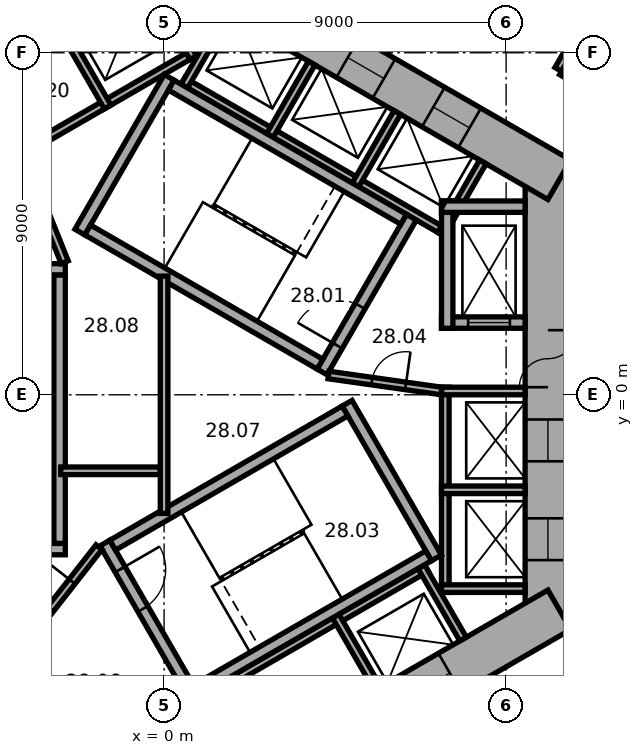
"""IFC4 building model, lengths in metres.
Left out: names, types, materials, properties, quantities, classifications, styles, units other than length and angle.
Written with IfcOpenShell. Run it as: python <this file> out.ifc"""

import sys

from ifc_helpers import new_model, si_unit, direction, frame, frame_2d, origin, place, context, subcontext, project, spatial, rectangle, extrude, element, fill, save


model = new_model("IFC4")
c1 = context("Model", 3, precision=1e-05, world=origin(), true_north=direction((0.0, 1.0)))
c2 = subcontext(c1, "Body", "Model", "MODEL_VIEW")
j1 = project(units=[si_unit("LENGTHUNIT", "METRE"), si_unit("PLANEANGLEUNIT", "RADIAN")], contexts=[c1])
p1 = place(None, origin())
s1 = spatial("IfcSite", under=j1, at=p1, CompositionType="ELEMENT")
p2 = place(p1, origin())
s2 = spatial("IfcBuilding", under=s1, at=p2, CompositionType="ELEMENT")
p3 = place(p2, frame((0.0, 0.0, 116.6)))
s3 = spatial("IfcBuildingStorey", under=s2, at=p3, CompositionType="ELEMENT", Elevation=116.6)
p4 = place(p3, frame((10.1, -6.177, 0.0), z_axis=(0.0, 0.0, 1.0), x_axis=(0.0, 1.0, 0.0)))
e1 = element("IfcWall", 1, at=p4, inside=s3, PredefinedType="SHEAR", context=c2, shape_type="SweptSolid", body=[
    extrude(rectangle(XDim=12.355, YDim=1.2, at=frame_2d((6.177, 0.0))), origin(), (0.0, 0.0, 1.0), 3.3),
])
p5 = place(p4, frame((6.378, 0.0, 0.0)))
e2 = element("IfcOpeningElement", 2, at=p5, cuts=e1, PredefinedType="OPENING", context=c2, shape_type="SweptSolid", body=[
    extrude(rectangle(XDim=1.5, YDim=2.1, at=frame_2d((0.75, 1.05))), frame((0.0, 0.61, 0.0), z_axis=(0.0, -1.0, 0.0), x_axis=(1.0, 0.0, 0.0)), (0.0, 0.0, 1.0), 1.22),
])
p6 = place(p4, frame((1.828, 0.0, 0.0)))
e3 = element("IfcOpeningElement", 3, at=p6, cuts=e1, PredefinedType="OPENING", context=c2, shape_type="SweptSolid", body=[
    extrude(rectangle(XDim=1.1, YDim=2.1, at=frame_2d((0.55, 1.05))), frame((0.0, 0.61, 0.0), z_axis=(0.0, -1.0, 0.0), x_axis=(1.0, 0.0, 0.0)), (0.0, 0.0, 1.0), 1.22),
])
p7 = place(p4, frame((4.427, 0.0, 0.0)))
e4 = element("IfcOpeningElement", 4, at=p7, cuts=e1, PredefinedType="OPENING", context=c2, shape_type="SweptSolid", body=[
    extrude(rectangle(XDim=1.1, YDim=2.1, at=frame_2d((0.55, 1.05))), frame((0.0, 0.61, 0.0), z_axis=(0.0, -1.0, 0.0), x_axis=(1.0, 0.0, 0.0)), (0.0, 0.0, 1.0), 1.22),
])
p8 = place(p3, frame((10.4, 5.658, 0.0), z_axis=(0.0, 0.0, 1.0), x_axis=(-0.866021384402, 0.500006961711, 0.0)))
e5 = element("IfcWall", 5, at=p8, inside=s3, PredefinedType="SHEAR", context=c2, shape_type="SweptSolid", body=[
    extrude(rectangle(XDim=12.355, YDim=1.2, at=frame_2d((6.178, 0.0))), origin(), (0.0, 0.0, 1.0), 3.3),
])
p9 = place(p8, frame((2.728, 0.0, 0.0)))
e6 = element("IfcOpeningElement", 6, at=p9, cuts=e5, PredefinedType="OPENING", context=c2, shape_type="SweptSolid", body=[
    extrude(rectangle(XDim=1.1, YDim=2.1, at=frame_2d((0.55, 1.05))), frame((0.0, 0.61, 0.0), z_axis=(0.0, -1.0, 0.0), x_axis=(1.0, 0.0, 0.0)), (0.0, 0.0, 1.0), 1.22),
])
p10 = place(p8, frame((5.328, 0.0, 0.0)))
e7 = element("IfcOpeningElement", 7, at=p10, cuts=e5, PredefinedType="OPENING", context=c2, shape_type="SweptSolid", body=[
    extrude(rectangle(XDim=1.1, YDim=2.1, at=frame_2d((0.55, 1.05))), frame((0.0, 0.61, 0.0), z_axis=(0.0, -1.0, 0.0), x_axis=(1.0, 0.0, 0.0)), (0.0, 0.0, 1.0), 1.22),
])
p11 = place(p8, frame((7.928, 0.0, 0.0)))
e8 = element("IfcOpeningElement", 8, at=p11, cuts=e5, PredefinedType="OPENING", context=c2, shape_type="SweptSolid", body=[
    extrude(rectangle(XDim=1.1, YDim=2.1, at=frame_2d((0.55, 1.05))), frame((0.0, 0.61, 0.0), z_axis=(0.0, -1.0, 0.0), x_axis=(1.0, 0.0, 0.0)), (0.0, 0.0, 1.0), 1.22),
])
p12 = place(p3, frame((0.3, 11.836, 0.0), z_axis=(0.0, 0.0, 1.0), x_axis=(-0.866021384402, -0.500006961711, 0.0)))
e9 = element("IfcWall", 9, at=p12, inside=s3, PredefinedType="SHEAR", context=c2, shape_type="SweptSolid", body=[
    extrude(rectangle(XDim=12.355, YDim=1.2, at=frame_2d((6.178, 0.0))), origin(), (0.0, 0.0, 1.0), 3.3),
])
p13 = place(p12, frame((6.378, 0.0, 0.0)))
e10 = element("IfcOpeningElement", 10, at=p13, cuts=e9, PredefinedType="OPENING", context=c2, shape_type="SweptSolid", body=[
    extrude(rectangle(XDim=1.5, YDim=2.1, at=frame_2d((0.75, 1.05))), frame((0.0, 0.61, 0.0), z_axis=(0.0, -1.0, 0.0), x_axis=(1.0, 0.0, 0.0)), (0.0, 0.0, 1.0), 1.22),
])
p14 = place(p12, frame((1.828, 0.0, 0.0)))
e11 = element("IfcOpeningElement", 11, at=p14, cuts=e9, PredefinedType="OPENING", context=c2, shape_type="SweptSolid", body=[
    extrude(rectangle(XDim=1.1, YDim=2.1, at=frame_2d((0.55, 1.05))), frame((0.0, 0.61, 0.0), z_axis=(0.0, -1.0, 0.0), x_axis=(1.0, 0.0, 0.0)), (0.0, 0.0, 1.0), 1.22),
])
p15 = place(p3, frame((-10.4, -5.658, 0.0), z_axis=(0.0, 0.0, 1.0), x_axis=(0.866021384402, -0.500006961711, 0.0)))
e12 = element("IfcWall", 12, at=p15, inside=s3, PredefinedType="SHEAR", context=c2, shape_type="SweptSolid", body=[
    extrude(rectangle(XDim=12.355, YDim=1.2, at=frame_2d((6.178, 0.0))), origin(), (0.0, 0.0, 1.0), 3.3),
])
p16 = place(p15, frame((6.378, 0.0, 0.0)))
e13 = element("IfcOpeningElement", 13, at=p16, cuts=e12, PredefinedType="OPENING", context=c2, shape_type="SweptSolid", body=[
    extrude(rectangle(XDim=1.5, YDim=2.1, at=frame_2d((0.75, 1.05))), frame((0.0, 0.61, 0.0), z_axis=(0.0, -1.0, 0.0), x_axis=(1.0, 0.0, 0.0)), (0.0, 0.0, 1.0), 1.22),
])
p17 = place(p15, frame((3.228, 0.0, 0.0)))
e14 = element("IfcOpeningElement", 14, at=p17, cuts=e12, PredefinedType="OPENING", context=c2, shape_type="SweptSolid", body=[
    extrude(rectangle(XDim=0.9, YDim=2.1, at=frame_2d((0.45, 1.05))), frame((0.0, 0.61, 0.0), z_axis=(0.0, -1.0, 0.0), x_axis=(1.0, 0.0, 0.0)), (0.0, 0.0, 1.0), 1.22),
])
p18 = place(p3, frame((-0.3, -11.836, 0.0), z_axis=(0.0, 0.0, 1.0), x_axis=(0.866021384402, 0.500006961711, 0.0)))
e15 = element("IfcWall", 15, at=p18, inside=s3, PredefinedType="SHEAR", context=c2, shape_type="SweptSolid", body=[
    extrude(rectangle(XDim=12.355, YDim=1.2, at=frame_2d((6.178, 0.0))), origin(), (0.0, 0.0, 1.0), 3.3),
])
p19 = place(p18, frame((4.128, 0.0, 0.0)))
e16 = element("IfcOpeningElement", 16, at=p19, cuts=e15, PredefinedType="OPENING", context=c2, shape_type="SweptSolid", body=[
    extrude(rectangle(XDim=0.9, YDim=2.1, at=frame_2d((0.45, 1.05))), frame((0.0, 0.61, 0.0), z_axis=(0.0, -1.0, 0.0), x_axis=(1.0, 0.0, 0.0)), (0.0, 0.0, 1.0), 1.22),
])
p20 = place(p18, frame((7.928, 0.0, 0.0)))
e17 = element("IfcOpeningElement", 17, at=p20, cuts=e15, PredefinedType="OPENING", context=c2, shape_type="SweptSolid", body=[
    extrude(rectangle(XDim=1.1, YDim=2.1, at=frame_2d((0.55, 1.05))), frame((0.0, 0.61, 0.0), z_axis=(0.0, -1.0, 0.0), x_axis=(1.0, 0.0, 0.0)), (0.0, 0.0, 1.0), 1.22),
])
p21 = place(p3, frame((7.4, -5.2, 0.0), z_axis=(0.0, 0.0, 1.0), x_axis=(0.0, 1.0, 0.0)))
e18 = element("IfcWall", 18, at=p21, inside=s3, PredefinedType="PARTITIONING", context=c2, shape_type="SweptSolid", body=[
    extrude(rectangle(XDim=5.4, YDim=0.2, at=frame_2d((2.7, 0.0))), origin(), (0.0, 0.0, 1.0), 2.95),
])
for number, where, z_axis, x_axis in (
    (19, (7.3, -5.1, 0.0), (0.0, 0.0, 1.0), (1.0, 0.0, 0.0)),
    (20, (7.3, -2.5, 0.0), (0.0, 0.0, 1.0), (1.0, 0.0, 0.0)),
    (21, (7.3, 0.1, 0.0), (0.0, 0.0, 1.0), (1.0, 0.0, 0.0)),
):
    element("IfcWall", number, at=place(p3, frame(where, z_axis=z_axis, x_axis=x_axis)), inside=s3, PredefinedType="PARTITIONING", context=c2, shape_type="SweptSolid", body=[
        extrude(rectangle(XDim=2.2, YDim=0.2, at=frame_2d((1.1, 0.0))), origin(), (0.0, 0.0, 1.0), 2.95),
    ])
p22 = place(p3, frame((7.424, 4.259, 0.0), z_axis=(0.0, 0.0, 1.0), x_axis=(-0.866026010844, 0.49999894854, 0.0)))
e22 = element("IfcWall", 22, at=p22, inside=s3, PredefinedType="PARTITIONING", context=c2, shape_type="SweptSolid", body=[
    extrude(rectangle(XDim=8.0, YDim=0.2, at=frame_2d((4.0, 0.0))), origin(), (0.0, 0.0, 1.0), 2.95),
])
for number, where, z_axis, x_axis in (
    (23, (7.287, 4.222, 0.0), (0.0, 0.0, 1.0), (0.5, 0.866, 0.0)),
    (24, (5.036, 5.522, 0.0), (0.0, 0.0, 1.0), (0.5, 0.866, 0.0)),
    (25, (2.784, 6.822, 0.0), (0.0, 0.0, 1.0), (0.5, 0.866, 0.0)),
    (26, (0.532, 8.122, 0.0), (0.0, 0.0, 1.0), (0.5, 0.866, 0.0)),
):
    element("IfcWall", number, at=place(p3, frame(where, z_axis=z_axis, x_axis=x_axis)), inside=s3, PredefinedType="PARTITIONING", context=c2, shape_type="SweptSolid", body=[
        extrude(rectangle(XDim=2.2, YDim=0.2, at=frame_2d((1.1, 0.0))), origin(), (0.0, 0.0, 1.0), 2.95),
    ])
p23 = place(p3, frame((0.803, 9.009, 0.0), z_axis=(0.0, 0.0, 1.0), x_axis=(-0.866028230842, -0.499995103361, 0.0)))
e27 = element("IfcWall", 27, at=p23, inside=s3, PredefinedType="PARTITIONING", context=c2, shape_type="SweptSolid", body=[
    extrude(rectangle(XDim=5.4, YDim=0.2, at=frame_2d((2.7, 0.0))), origin(), (0.0, 0.0, 1.0), 2.95),
])
p24 = place(p3, frame((0.767, 8.872, 0.0), z_axis=(0.0, 0.0, 1.0), x_axis=(-0.499994660107, 0.866028486751, 0.0)))
e28 = element("IfcWall", 28, at=p24, inside=s3, PredefinedType="PARTITIONING", context=c2, shape_type="SweptSolid", body=[
    extrude(rectangle(XDim=2.2, YDim=0.2, at=frame_2d((1.1, 0.0))), origin(), (0.0, 0.0, 1.0), 2.95),
])
p25 = place(p3, frame((-1.485, 7.572, 0.0), z_axis=(0.0, 0.0, 1.0), x_axis=(-0.50002983664, 0.866008176907, 0.0)))
e29 = element("IfcWall", 29, at=p25, inside=s3, PredefinedType="PARTITIONING", context=c2, shape_type="SweptSolid", body=[
    extrude(rectangle(XDim=2.2, YDim=0.2, at=frame_2d((1.1, 0.0))), origin(), (0.0, 0.0, 1.0), 2.95),
])
p26 = place(p3, frame((-0.024, -8.559, 0.0), z_axis=(0.0, 0.0, 1.0), x_axis=(0.866026010844, 0.49999894854, 0.0)))
e30 = element("IfcWall", 30, at=p26, inside=s3, PredefinedType="PARTITIONING", context=c2, shape_type="SweptSolid", body=[
    extrude(rectangle(XDim=8.0, YDim=0.2, at=frame_2d((4.0, 0.0))), origin(), (0.0, 0.0, 1.0), 2.95),
])
for number, where, z_axis, x_axis in (
    (31, (4.516, -5.822, 0.0), (0.0, 0.0, 1.0), (0.5, -0.866, 0.0)),
    (32, (6.768, -4.522, 0.0), (0.0, 0.0, 1.0), (0.5, -0.866, 0.0)),
):
    element("IfcWall", number, at=place(p3, frame(where, z_axis=z_axis, x_axis=x_axis)), inside=s3, PredefinedType="PARTITIONING", context=c2, shape_type="SweptSolid", body=[
        extrude(rectangle(XDim=2.2, YDim=0.2, at=frame_2d((1.1, 0.0))), origin(), (0.0, 0.0, 1.0), 2.95),
    ])
p27 = place(p3, frame((4.158, 0.602, 0.0), z_axis=(0.0, 0.0, 1.0), x_axis=(0.499977259774, 0.866038532462, 0.0)))
e33 = element("IfcWall", 33, at=p27, inside=s3, PredefinedType="SHEAR", context=c2, shape_type="SweptSolid", body=[
    extrude(rectangle(XDim=4.7, YDim=0.3, at=frame_2d((2.35, 0.0))), origin(), (0.0, 0.0, 1.0), 2.95),
])
p28 = place(p27, frame((0.8, 0.0, 0.0)))
e34 = element("IfcOpeningElement", 34, at=p28, cuts=e33, PredefinedType="OPENING", context=c2, shape_type="SweptSolid", body=[
    extrude(rectangle(XDim=1.2, YDim=2.1, at=frame_2d((0.6, 1.05))), frame((0.0, 0.16, 0.0), z_axis=(0.0, -1.0, 0.0), x_axis=(1.0, 0.0, 0.0)), (0.0, 0.0, 1.0), 0.32),
])
p29 = place(p3, frame((-2.216, 4.282, 0.0), z_axis=(0.0, 0.0, 1.0), x_axis=(0.499977259774, 0.866038532462, 0.0)))
e35 = element("IfcWall", 35, at=p29, inside=s3, PredefinedType="SHEAR", context=c2, shape_type="SweptSolid", body=[
    extrude(rectangle(XDim=4.7, YDim=0.3, at=frame_2d((2.35, 0.0))), origin(), (0.0, 0.0, 1.0), 2.95),
])
for number, where, z_axis, x_axis in (
    (36, (4.103, 0.807, 0.0), (0.0, 0.0, 1.0), (-0.866, 0.5, 0.0)),
    (37, (6.303, 4.617, 0.0), (0.0, 0.0, 1.0), (-0.866, 0.5, 0.0)),
):
    element("IfcWall", number, at=place(p3, frame(where, z_axis=z_axis, x_axis=x_axis)), inside=s3, PredefinedType="SHEAR", context=c2, shape_type="SweptSolid", body=[
        extrude(rectangle(XDim=7.06, YDim=0.3, at=frame_2d((3.53, 0.0))), origin(), (0.0, 0.0, 1.0), 2.95),
    ])
p30 = place(p3, frame((-2.6, 3.3, 0.0), z_axis=(0.0, 0.0, 1.0), x_axis=(-1.0, 0.0, 0.0)))
e38 = element("IfcWall", 38, at=p30, inside=s3, PredefinedType="SHEAR", context=c2, shape_type="SweptSolid", body=[
    extrude(rectangle(XDim=4.7, YDim=0.3, at=frame_2d((2.35, 0.0))), origin(), (0.0, 0.0, 1.0), 2.95),
])
p31 = place(p30, frame((0.8, 0.0, 0.0)))
e39 = element("IfcOpeningElement", 39, at=p31, cuts=e38, PredefinedType="OPENING", context=c2, shape_type="SweptSolid", body=[
    extrude(rectangle(XDim=1.2, YDim=2.1, at=frame_2d((0.6, 1.05))), frame((0.0, 0.16, 0.0), z_axis=(0.0, -1.0, 0.0), x_axis=(1.0, 0.0, 0.0)), (0.0, 0.0, 1.0), 0.32),
])
p32 = place(p3, frame((-2.6, -4.06, 0.0), z_axis=(0.0, 0.0, 1.0), x_axis=(-1.0, 0.0, 0.0)))
e40 = element("IfcWall", 40, at=p32, inside=s3, PredefinedType="SHEAR", context=c2, shape_type="SweptSolid", body=[
    extrude(rectangle(XDim=4.7, YDim=0.3, at=frame_2d((2.35, 0.0))), origin(), (0.0, 0.0, 1.0), 2.95),
])
p33 = place(p3, frame((-2.75, 3.15, 0.0), z_axis=(0.0, 0.0, 1.0), x_axis=(0.0, -1.0, 0.0)))
e41 = element("IfcWall", 41, at=p33, inside=s3, PredefinedType="SHEAR", context=c2, shape_type="SweptSolid", body=[
    extrude(rectangle(XDim=7.06, YDim=0.3, at=frame_2d((3.53, 0.0))), origin(), (0.0, 0.0, 1.0), 2.95),
])
p34 = place(p3, frame((-1.558, -3.902, 0.0), z_axis=(0.0, 0.0, 1.0), x_axis=(0.499977259774, -0.866038532462, 0.0)))
e42 = element("IfcWall", 42, at=p34, inside=s3, PredefinedType="SHEAR", context=c2, shape_type="SweptSolid", body=[
    extrude(rectangle(XDim=4.7, YDim=0.3, at=frame_2d((2.35, 0.0))), origin(), (0.0, 0.0, 1.0), 2.95),
])
p35 = place(p34, frame((0.8, 0.0, 0.0)))
e43 = element("IfcOpeningElement", 43, at=p35, cuts=e42, PredefinedType="OPENING", context=c2, shape_type="SweptSolid", body=[
    extrude(rectangle(XDim=1.2, YDim=2.1, at=frame_2d((0.6, 1.05))), frame((0.0, 0.16, 0.0), z_axis=(0.0, -1.0, 0.0), x_axis=(1.0, 0.0, 0.0)), (0.0, 0.0, 1.0), 0.32),
])
p36 = place(p3, frame((4.816, -0.222, 0.0), z_axis=(0.0, 0.0, 1.0), x_axis=(0.499977259774, -0.866038532462, 0.0)))
e44 = element("IfcWall", 44, at=p36, inside=s3, PredefinedType="SHEAR", context=c2, shape_type="SweptSolid", body=[
    extrude(rectangle(XDim=4.7, YDim=0.3, at=frame_2d((2.35, 0.0))), origin(), (0.0, 0.0, 1.0), 2.95),
])
for number, where, z_axis, x_axis in (
    (45, (-1.353, -3.957, 0.0), (0.0, 0.0, 1.0), (0.866, 0.5, 0.0)),
    (46, (0.847, -7.767, 0.0), (0.0, 0.0, 1.0), (0.866, 0.5, 0.0)),
):
    element("IfcWall", number, at=place(p3, frame(where, z_axis=z_axis, x_axis=x_axis)), inside=s3, PredefinedType="SHEAR", context=c2, shape_type="SweptSolid", body=[
        extrude(rectangle(XDim=7.06, YDim=0.3, at=frame_2d((3.53, 0.0))), origin(), (0.0, 0.0, 1.0), 2.95),
    ])
p37 = place(p3, frame((7.3, 1.9, 0.0), z_axis=(0.0, 0.0, 1.0), x_axis=(1.0, 0.0, 0.0)))
e47 = element("IfcWall", 47, at=p37, inside=s3, PredefinedType="SHEAR", context=c2, shape_type="SweptSolid", body=[
    extrude(rectangle(XDim=2.2, YDim=0.3, at=frame_2d((1.1, 0.0))), origin(), (0.0, 0.0, 1.0), 2.95),
])
p38 = place(p37, frame((0.7, 0.0, 0.0)))
e48 = element("IfcOpeningElement", 48, at=p38, cuts=e47, PredefinedType="OPENING", context=c2, shape_type="SweptSolid", body=[
    extrude(rectangle(XDim=1.1, YDim=2.1, at=frame_2d((0.55, 1.05))), frame((0.0, 0.16, 0.0), z_axis=(0.0, -1.0, 0.0), x_axis=(1.0, 0.0, 0.0)), (0.0, 0.0, 1.0), 0.32),
])
p39 = place(p3, frame((7.45, 1.75, 0.0), z_axis=(0.0, 0.0, 1.0), x_axis=(0.0, 1.0, 0.0)))
e49 = element("IfcWall", 49, at=p39, inside=s3, PredefinedType="SHEAR", context=c2, shape_type="SweptSolid", body=[
    extrude(rectangle(XDim=3.35, YDim=0.3, at=frame_2d((1.675, 0.0))), origin(), (0.0, 0.0, 1.0), 2.95),
])
p40 = place(p3, frame((7.3, 4.95, 0.0), z_axis=(0.0, 0.0, 1.0), x_axis=(1.0, 0.0, 0.0)))
e50 = element("IfcWall", 50, at=p40, inside=s3, PredefinedType="SHEAR", context=c2, shape_type="SweptSolid", body=[
    extrude(rectangle(XDim=2.2, YDim=0.3, at=frame_2d((1.1, 0.0))), origin(), (0.0, 0.0, 1.0), 2.95),
])
p41 = place(p3, frame((4.327, 0.521, 0.0), z_axis=(0.0, 0.0, 1.0), x_axis=(0.990124376366, -0.14019172346, 0.0)))
e51 = element("IfcWall", 51, at=p41, inside=s3, PredefinedType="PARTITIONING", context=c2, shape_type="SweptSolid", body=[
    extrude(rectangle(XDim=3.002, YDim=0.2, at=frame_2d((1.501, 0.0))), origin(), (0.0, 0.0, 1.0), 2.95),
])
p42 = place(p41, frame((1.15, 0.0, 0.0)))
e52 = element("IfcOpeningElement", 52, at=p42, cuts=e51, PredefinedType="OPENING", context=c2, shape_type="SweptSolid", body=[
    extrude(rectangle(XDim=0.9, YDim=2.1, at=frame_2d((0.45, 1.05))), frame((0.0, 0.11, 0.0), z_axis=(0.0, -1.0, 0.0), x_axis=(1.0, 0.0, 0.0)), (0.0, 0.0, 1.0), 0.22),
])
p43 = place(p3, frame((-2.615, 3.487, 0.0), z_axis=(0.0, 0.0, 1.0), x_axis=(-0.373576831041, 0.92759924068, 0.0)))
e53 = element("IfcWall", 53, at=p43, inside=s3, PredefinedType="PARTITIONING", context=c2, shape_type="SweptSolid", body=[
    extrude(rectangle(XDim=3.002, YDim=0.2, at=frame_2d((1.501, 0.0))), origin(), (0.0, 0.0, 1.0), 2.95),
])
p44 = place(p43, frame((1.15, 0.0, 0.0)))
e54 = element("IfcOpeningElement", 54, at=p44, cuts=e53, PredefinedType="OPENING", context=c2, shape_type="SweptSolid", body=[
    extrude(rectangle(XDim=0.9, YDim=2.1, at=frame_2d((0.45, 1.05))), frame((0.0, 0.11, 0.0), z_axis=(0.0, -1.0, 0.0), x_axis=(1.0, 0.0, 0.0)), (0.0, 0.0, 1.0), 0.22),
])
p45 = place(p3, frame((-1.712, -4.008, 0.0), z_axis=(0.0, 0.0, 1.0), x_axis=(-0.616549420702, -0.787316208287, 0.0)))
e55 = element("IfcWall", 55, at=p45, inside=s3, PredefinedType="PARTITIONING", context=c2, shape_type="SweptSolid", body=[
    extrude(rectangle(XDim=3.002, YDim=0.2, at=frame_2d((1.501, 0.0))), origin(), (0.0, 0.0, 1.0), 2.95),
])
p46 = place(p45, frame((1.15, 0.0, 0.0)))
e56 = element("IfcOpeningElement", 56, at=p46, cuts=e55, PredefinedType="OPENING", context=c2, shape_type="SweptSolid", body=[
    extrude(rectangle(XDim=0.9, YDim=2.1, at=frame_2d((0.45, 1.05))), frame((0.0, 0.11, 0.0), z_axis=(0.0, -1.0, 0.0), x_axis=(1.0, 0.0, 0.0)), (0.0, 0.0, 1.0), 0.22),
])
p47 = place(p3, frame((-2.72, -2.0, 0.0), z_axis=(0.0, 0.0, 1.0), x_axis=(1.0, 0.0, 0.0)))
e57 = element("IfcWall", 57, at=p47, inside=s3, PredefinedType="PARTITIONING", context=c2, shape_type="SweptSolid", body=[
    extrude(rectangle(XDim=2.62, YDim=0.2, at=frame_2d((1.31, 0.0))), origin(), (0.0, 0.0, 1.0), 2.95),
])
p48 = place(p3, frame((0.0, -3.122, 0.0), z_axis=(0.0, 0.0, 1.0), x_axis=(0.0, 1.0, 0.0)))
e58 = element("IfcWall", 58, at=p48, inside=s3, PredefinedType="PARTITIONING", context=c2, shape_type="SweptSolid", body=[
    extrude(rectangle(XDim=6.245, YDim=0.2, at=frame_2d((3.122, 0.0))), origin(), (0.0, 0.0, 1.0), 2.95),
])
p49 = place(p3, frame((10.371, 8.561, 0.0), z_axis=(0.0, 0.0, 1.0), x_axis=(0.499986357472, 0.866033280158, 0.0)))
e59 = element("IfcWall", 59, at=p49, inside=s3, PredefinedType="PARTITIONING", context=c2, shape_type="SweptSolid", body=[
    extrude(rectangle(XDim=1.201, YDim=0.2, at=frame_2d((0.601, 0.0))), origin(), (0.0, 0.0, 1.0), 2.95),
])
p50 = place(p3, frame((11.566, 7.871, 0.0), z_axis=(0.0, 0.0, 1.0), x_axis=(-0.866004557827, 0.500036104519, 0.0)))
e60 = element("IfcWall", 60, at=p50, inside=s3, PredefinedType="PARTITIONING", context=c2, shape_type="SweptSolid", body=[
    extrude(rectangle(XDim=1.28, YDim=0.2, at=frame_2d((0.64, 0.0))), origin(), (0.0, 0.0, 1.0), 2.95),
])
p51 = place(p5, origin())
e61 = element("IfcDoor", 61, at=p51, inside=s3, OperationType="DOUBLE_DOOR_SINGLE_SWING", PredefinedType="DOOR", context=c2, shape_type="SweptSolid", body=[
    extrude(rectangle(XDim=1.5, YDim=2.1, at=frame_2d((0.75, 1.05))), frame((0.0, 0.025, 0.0), z_axis=(0.0, -1.0, 0.0), x_axis=(1.0, 0.0, 0.0)), (0.0, 0.0, 1.0), 0.05),
])
fill(e2, e61)
p52 = place(p28, origin())
e62 = element("IfcDoor", 62, at=p52, inside=s3, OperationType="SINGLE_SWING_RIGHT", PredefinedType="DOOR", context=c2, shape_type="SweptSolid", body=[
    extrude(rectangle(XDim=1.2, YDim=2.1, at=frame_2d((0.6, 1.05))), frame((0.0, 0.025, 0.0), z_axis=(0.0, -1.0, 0.0), x_axis=(1.0, 0.0, 0.0)), (0.0, 0.0, 1.0), 0.05),
])
fill(e34, e62)
p53 = place(p35, origin())
e63 = element("IfcDoor", 63, at=p53, inside=s3, OperationType="SINGLE_SWING_RIGHT", PredefinedType="DOOR", context=c2, shape_type="SweptSolid", body=[
    extrude(rectangle(XDim=1.2, YDim=2.1, at=frame_2d((0.6, 1.05))), frame((0.0, 0.025, 0.0), z_axis=(0.0, -1.0, 0.0), x_axis=(1.0, 0.0, 0.0)), (0.0, 0.0, 1.0), 0.05),
])
fill(e43, e63)
p54 = place(p42, origin())
e64 = element("IfcDoor", 64, at=p54, inside=s3, OperationType="SINGLE_SWING_LEFT", PredefinedType="DOOR", context=c2, shape_type="SweptSolid", body=[
    extrude(rectangle(XDim=0.9, YDim=2.1, at=frame_2d((0.45, 1.05))), frame((0.0, 0.025, 0.0), z_axis=(0.0, -1.0, 0.0), x_axis=(1.0, 0.0, 0.0)), (0.0, 0.0, 1.0), 0.05),
])
fill(e52, e64)
p55 = place(p46, origin())
e65 = element("IfcDoor", 65, at=p55, inside=s3, OperationType="SINGLE_SWING_LEFT", PredefinedType="DOOR", context=c2, shape_type="SweptSolid", body=[
    extrude(rectangle(XDim=0.9, YDim=2.1, at=frame_2d((0.45, 1.05))), frame((0.0, 0.025, 0.0), z_axis=(0.0, -1.0, 0.0), x_axis=(1.0, 0.0, 0.0)), (0.0, 0.0, 1.0), 0.05),
])
fill(e56, e65)
p56 = place(p38, origin())
e66 = element("IfcDoor", 66, at=p56, inside=s3, OperationType="DOUBLE_DOOR_SLIDING", PredefinedType="DOOR", context=c2, shape_type="SweptSolid", body=[
    extrude(rectangle(XDim=1.1, YDim=2.1, at=frame_2d((0.55, 1.05))), frame((0.0, 0.025, 0.0), z_axis=(0.0, -1.0, 0.0), x_axis=(1.0, 0.0, 0.0)), (0.0, 0.0, 1.0), 0.05),
])
fill(e48, e66)
p57 = place(p6, origin())
e67 = element("IfcDoor", 67, at=p57, inside=s3, OperationType="DOUBLE_DOOR_SLIDING", PredefinedType="DOOR", context=c2, shape_type="SweptSolid", body=[
    extrude(rectangle(XDim=1.1, YDim=2.1, at=frame_2d((0.55, 1.05))), frame((0.0, 0.025, 0.0), z_axis=(0.0, -1.0, 0.0), x_axis=(1.0, 0.0, 0.0)), (0.0, 0.0, 1.0), 0.05),
])
fill(e3, e67)
p58 = place(p7, origin())
e68 = element("IfcDoor", 68, at=p58, inside=s3, OperationType="DOUBLE_DOOR_SLIDING", PredefinedType="DOOR", context=c2, shape_type="SweptSolid", body=[
    extrude(rectangle(XDim=1.1, YDim=2.1, at=frame_2d((0.55, 1.05))), frame((0.0, 0.025, 0.0), z_axis=(0.0, -1.0, 0.0), x_axis=(1.0, 0.0, 0.0)), (0.0, 0.0, 1.0), 0.05),
])
fill(e4, e68)
p59 = place(p9, origin())
e69 = element("IfcDoor", 69, at=p59, inside=s3, OperationType="DOUBLE_DOOR_SLIDING", PredefinedType="DOOR", context=c2, shape_type="SweptSolid", body=[
    extrude(rectangle(XDim=1.1, YDim=2.1, at=frame_2d((0.55, 1.05))), frame((0.0, 0.025, 0.0), z_axis=(0.0, -1.0, 0.0), x_axis=(1.0, 0.0, 0.0)), (0.0, 0.0, 1.0), 0.05),
])
fill(e6, e69)
p60 = place(p10, origin())
e70 = element("IfcDoor", 70, at=p60, inside=s3, OperationType="DOUBLE_DOOR_SLIDING", PredefinedType="DOOR", context=c2, shape_type="SweptSolid", body=[
    extrude(rectangle(XDim=1.1, YDim=2.1, at=frame_2d((0.55, 1.05))), frame((0.0, 0.025, 0.0), z_axis=(0.0, -1.0, 0.0), x_axis=(1.0, 0.0, 0.0)), (0.0, 0.0, 1.0), 0.05),
])
fill(e7, e70)
p61 = place(p20, origin())
e71 = element("IfcDoor", 71, at=p61, inside=s3, OperationType="DOUBLE_DOOR_SLIDING", PredefinedType="DOOR", context=c2, shape_type="SweptSolid", body=[
    extrude(rectangle(XDim=1.1, YDim=2.1, at=frame_2d((0.55, 1.05))), frame((0.0, 0.025, 0.0), z_axis=(0.0, -1.0, 0.0), x_axis=(1.0, 0.0, 0.0)), (0.0, 0.0, 1.0), 0.05),
])
fill(e17, e71)
save(model, sys.argv[1])
